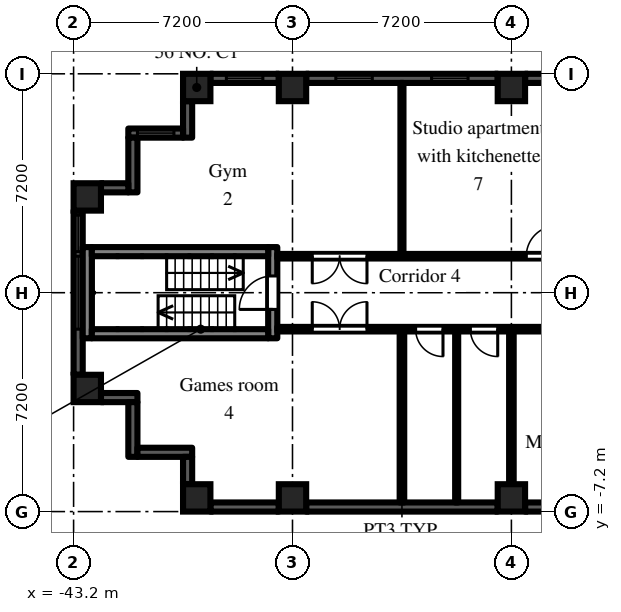
"""IFC4 building model, lengths in metres.
Left out: names, types, materials, properties, quantities, classifications, styles, units other than length and angle.
Written with IfcOpenShell. Run it as: python <this file> out.ifc"""

import sys

from ifc_helpers import new_model, si_unit, direction, frame, frame_2d, origin, origin_2d, place, context, subcontext, project, spatial, rectangle, extrude, element, fill, save


model = new_model("IFC4")
c1 = context("Model", 3, precision=1e-05, world=origin(), true_north=direction((0.0, 1.0)))
c2 = subcontext(c1, "Body", "Model", "MODEL_VIEW")
j1 = project(units=[si_unit("LENGTHUNIT", "METRE"), si_unit("PLANEANGLEUNIT", "RADIAN")], contexts=[c1])
p1 = place(None, origin())
s1 = spatial("IfcSite", under=j1, at=p1, CompositionType="ELEMENT")
p2 = place(p1, origin())
s2 = spatial("IfcBuilding", under=s1, at=p2, CompositionType="ELEMENT")
p3 = place(p2, frame((0.0, 0.0, 53.7)))
s3 = spatial("IfcBuildingStorey", under=s2, at=p3, CompositionType="ELEMENT", Elevation=53.7)
for number, where, z_axis, x_axis in (
    (1, (-42.75, -3.15, 0.0), (0.0, 0.0, 1.0), (1.0, 0.0, 0.0)),
    (2, (-42.75, 3.15, 0.0), (0.0, 0.0, 1.0), (1.0, 0.0, 0.0)),
    (3, (-39.15, -6.75, 0.0), (0.0, 0.0, 1.0), (1.0, 0.0, 0.0)),
    (4, (-39.15, 6.75, 0.0), (0.0, 0.0, 1.0), (1.0, 0.0, 0.0)),
    (5, (-36.0, -6.75, 0.0), (0.0, 0.0, 1.0), (1.0, 0.0, 0.0)),
    (6, (-36.0, 6.75, 0.0), (0.0, 0.0, 1.0), (1.0, 0.0, 0.0)),
    (7, (-28.8, -6.75, 0.0), (0.0, 0.0, 1.0), (1.0, 0.0, 0.0)),
    (8, (-28.8, 6.75, 0.0), (0.0, 0.0, 1.0), (1.0, 0.0, 0.0)),
):
    element("IfcColumn", number, at=place(p3, frame(where, z_axis=z_axis, x_axis=x_axis)), inside=s3, PredefinedType="COLUMN", context=c2, shape_type="SweptSolid", body=[
        extrude(rectangle(XDim=0.9, YDim=0.9, at=origin_2d()), origin(), (0.0, 0.0, 1.0), 3.0),
    ])
p4 = place(p3, frame((-25.2, 7.05, 0.0), z_axis=(0.0, 0.0, 1.0), x_axis=(-1.0, 0.0, 0.0)))
e9 = element("IfcWall", 9, at=p4, inside=s3, PredefinedType="SOLIDWALL", context=c2, shape_type="SweptSolid", body=[
    extrude(rectangle(XDim=3.15, YDim=0.3, at=frame_2d((1.575, 0.0))), origin(), (0.0, 0.0, 1.0), 2.1),
])
p5 = place(p4, frame((0.975, 0.0, 0.2)))
e10 = element("IfcOpeningElement", 10, at=p5, cuts=e9, PredefinedType="OPENING", context=c2, shape_type="SweptSolid", body=[
    extrude(rectangle(XDim=1.2, YDim=1.85, at=frame_2d((0.6, 0.925))), frame((0.0, 0.16, 0.0), z_axis=(0.0, -1.0, 0.0), x_axis=(1.0, 0.0, 0.0)), (0.0, 0.0, 1.0), 0.32),
])
p6 = place(p3, frame((-29.25, 7.05, 0.0), z_axis=(0.0, 0.0, 1.0), x_axis=(-1.0, 0.0, 0.0)))
e11 = element("IfcWall", 11, at=p6, inside=s3, PredefinedType="SOLIDWALL", context=c2, shape_type="SweptSolid", body=[
    extrude(rectangle(XDim=6.3, YDim=0.3, at=frame_2d((3.15, 0.0))), origin(), (0.0, 0.0, 1.0), 2.1),
])
p7 = place(p6, frame((0.975, 0.0, 0.2)))
e12 = element("IfcOpeningElement", 12, at=p7, cuts=e11, PredefinedType="OPENING", context=c2, shape_type="SweptSolid", body=[
    extrude(rectangle(XDim=1.2, YDim=1.85, at=frame_2d((0.6, 0.925))), frame((0.0, 0.16, 0.0), z_axis=(0.0, -1.0, 0.0), x_axis=(1.0, 0.0, 0.0)), (0.0, 0.0, 1.0), 0.32),
])
p8 = place(p6, frame((4.125, 0.0, 0.2)))
e13 = element("IfcOpeningElement", 13, at=p8, cuts=e11, PredefinedType="OPENING", context=c2, shape_type="SweptSolid", body=[
    extrude(rectangle(XDim=1.2, YDim=1.85, at=frame_2d((0.6, 0.925))), frame((0.0, 0.16, 0.0), z_axis=(0.0, -1.0, 0.0), x_axis=(1.0, 0.0, 0.0)), (0.0, 0.0, 1.0), 0.32),
])
p9 = place(p3, frame((-36.45, 7.05, 0.0), z_axis=(0.0, 0.0, 1.0), x_axis=(-1.0, 0.0, 0.0)))
e14 = element("IfcWall", 14, at=p9, inside=s3, PredefinedType="SOLIDWALL", context=c2, shape_type="SweptSolid", body=[
    extrude(rectangle(XDim=2.25, YDim=0.3, at=frame_2d((1.125, 0.0))), origin(), (0.0, 0.0, 1.0), 2.1),
])
p10 = place(p9, frame((0.525, 0.0, 0.2)))
e15 = element("IfcOpeningElement", 15, at=p10, cuts=e14, PredefinedType="OPENING", context=c2, shape_type="SweptSolid", body=[
    extrude(rectangle(XDim=1.2, YDim=1.85, at=frame_2d((0.6, 0.925))), frame((0.0, 0.16, 0.0), z_axis=(0.0, -1.0, 0.0), x_axis=(1.0, 0.0, 0.0)), (0.0, 0.0, 1.0), 0.32),
])
p11 = place(p3, frame((-39.45, 6.3, 0.0), z_axis=(0.0, 0.0, 1.0), x_axis=(0.0, -1.0, 0.0)))
e16 = element("IfcWall", 16, at=p11, inside=s3, PredefinedType="SOLIDWALL", context=c2, shape_type="SweptSolid", body=[
    extrude(rectangle(XDim=1.2, YDim=0.3, at=frame_2d((0.6, 0.0))), origin(), (0.0, 0.0, 1.0), 2.575),
])
p12 = place(p3, frame((-39.6, 5.25, 0.0), z_axis=(0.0, 0.0, 1.0), x_axis=(-1.0, 0.0, 0.0)))
e17 = element("IfcWall", 17, at=p12, inside=s3, PredefinedType="SOLIDWALL", context=c2, shape_type="SweptSolid", body=[
    extrude(rectangle(XDim=1.8, YDim=0.3, at=frame_2d((0.9, 0.0))), origin(), (0.0, 0.0, 1.0), 2.575),
])
p13 = place(p12, frame((0.3, 0.0, 0.2)))
e18 = element("IfcOpeningElement", 18, at=p13, cuts=e17, PredefinedType="OPENING", context=c2, shape_type="SweptSolid", body=[
    extrude(rectangle(XDim=1.2, YDim=1.85, at=frame_2d((0.6, 0.925))), frame((0.0, 0.16, 0.0), z_axis=(0.0, -1.0, 0.0), x_axis=(1.0, 0.0, 0.0)), (0.0, 0.0, 1.0), 0.32),
])
p14 = place(p3, frame((-41.25, 5.1, 0.0), z_axis=(0.0, 0.0, 1.0), x_axis=(0.0, -1.0, 0.0)))
e19 = element("IfcWall", 19, at=p14, inside=s3, PredefinedType="SOLIDWALL", context=c2, shape_type="SweptSolid", body=[
    extrude(rectangle(XDim=1.8, YDim=0.3, at=frame_2d((0.9, 0.0))), origin(), (0.0, 0.0, 1.0), 2.575),
])
p15 = place(p3, frame((-41.4, 3.45, 0.0), z_axis=(0.0, 0.0, 1.0), x_axis=(-1.0, 0.0, 0.0)))
e20 = element("IfcWall", 20, at=p15, inside=s3, PredefinedType="SOLIDWALL", context=c2, shape_type="SweptSolid", body=[
    extrude(rectangle(XDim=0.9, YDim=0.3, at=frame_2d((0.45, 0.0))), origin(), (0.0, 0.0, 1.0), 2.575),
])
p16 = place(p3, frame((-43.05, 2.7, 0.0), z_axis=(0.0, 0.0, 1.0), x_axis=(0.0, -1.0, 0.0)))
e21 = element("IfcWall", 21, at=p16, inside=s3, PredefinedType="SOLIDWALL", context=c2, shape_type="SweptSolid", body=[
    extrude(rectangle(XDim=5.4, YDim=0.3, at=frame_2d((2.7, 0.0))), origin(), (0.0, 0.0, 1.0), 2.1),
])
p17 = place(p16, frame((1.5, 0.0, 0.2)))
e22 = element("IfcOpeningElement", 22, at=p17, cuts=e21, PredefinedType="OPENING", context=c2, shape_type="SweptSolid", body=[
    extrude(rectangle(XDim=2.4, YDim=1.85, at=frame_2d((1.2, 0.925))), frame((0.0, 0.16, 0.0), z_axis=(0.0, -1.0, 0.0), x_axis=(1.0, 0.0, 0.0)), (0.0, 0.0, 1.0), 0.32),
])
p18 = place(p16, frame((0.15, 0.0, 0.2)))
e23 = element("IfcOpeningElement", 23, at=p18, cuts=e21, PredefinedType="OPENING", context=c2, shape_type="SweptSolid", body=[
    extrude(rectangle(XDim=1.2, YDim=1.85, at=frame_2d((0.6, 0.925))), frame((0.0, 0.16, 0.0), z_axis=(0.0, -1.0, 0.0), x_axis=(1.0, 0.0, 0.0)), (0.0, 0.0, 1.0), 0.32),
])
p19 = place(p3, frame((-42.3, -3.45, 0.0), z_axis=(0.0, 0.0, 1.0), x_axis=(1.0, 0.0, 0.0)))
e24 = element("IfcWall", 24, at=p19, inside=s3, PredefinedType="SOLIDWALL", context=c2, shape_type="SweptSolid", body=[
    extrude(rectangle(XDim=1.2, YDim=0.3, at=frame_2d((0.6, 0.0))), origin(), (0.0, 0.0, 1.0), 2.575),
])
p20 = place(p3, frame((-41.25, -3.6, 0.0), z_axis=(0.0, 0.0, 1.0), x_axis=(0.0, -1.0, 0.0)))
e25 = element("IfcWall", 25, at=p20, inside=s3, PredefinedType="SOLIDWALL", context=c2, shape_type="SweptSolid", body=[
    extrude(rectangle(XDim=1.8, YDim=0.3, at=frame_2d((0.9, 0.0))), origin(), (0.0, 0.0, 1.0), 2.575),
])
p21 = place(p3, frame((-41.1, -5.25, 0.0), z_axis=(0.0, 0.0, 1.0), x_axis=(1.0, 0.0, 0.0)))
e26 = element("IfcWall", 26, at=p21, inside=s3, PredefinedType="SOLIDWALL", context=c2, shape_type="SweptSolid", body=[
    extrude(rectangle(XDim=1.8, YDim=0.3, at=frame_2d((0.9, 0.0))), origin(), (0.0, 0.0, 1.0), 2.575),
])
p22 = place(p3, frame((-39.45, -5.4, 0.0), z_axis=(0.0, 0.0, 1.0), x_axis=(0.0, -1.0, 0.0)))
e27 = element("IfcWall", 27, at=p22, inside=s3, PredefinedType="SOLIDWALL", context=c2, shape_type="SweptSolid", body=[
    extrude(rectangle(XDim=0.9, YDim=0.3, at=frame_2d((0.45, 0.0))), origin(), (0.0, 0.0, 1.0), 2.575),
])
p23 = place(p3, frame((-38.7, -7.05, 0.0), z_axis=(0.0, 0.0, 1.0), x_axis=(1.0, 0.0, 0.0)))
e28 = element("IfcWall", 28, at=p23, inside=s3, PredefinedType="SOLIDWALL", context=c2, shape_type="SweptSolid", body=[
    extrude(rectangle(XDim=2.25, YDim=0.3, at=frame_2d((1.125, 0.0))), origin(), (0.0, 0.0, 1.0), 2.1),
])
p24 = place(p3, frame((-35.55, -7.05, 0.0), z_axis=(0.0, 0.0, 1.0), x_axis=(1.0, 0.0, 0.0)))
e29 = element("IfcWall", 29, at=p24, inside=s3, PredefinedType="SOLIDWALL", context=c2, shape_type="SweptSolid", body=[
    extrude(rectangle(XDim=6.3, YDim=0.3, at=frame_2d((3.15, 0.0))), origin(), (0.0, 0.0, 1.0), 2.1),
])
p25 = place(p3, frame((-28.35, -7.05, 0.0), z_axis=(0.0, 0.0, 1.0), x_axis=(1.0, 0.0, 0.0)))
e30 = element("IfcWall", 30, at=p25, inside=s3, PredefinedType="SOLIDWALL", context=c2, shape_type="SweptSolid", body=[
    extrude(rectangle(XDim=3.15, YDim=0.3, at=frame_2d((1.575, 0.0))), origin(), (0.0, 0.0, 1.0), 2.1),
])
p26 = place(p3, frame((-36.65, -1.5, 0.0), z_axis=(0.0, 0.0, 1.0), x_axis=(0.0, 1.0, 0.0)))
e31 = element("IfcWall", 31, at=p26, inside=s3, PredefinedType="SHEAR", context=c2, shape_type="SweptSolid", body=[
    extrude(rectangle(XDim=3.0, YDim=0.3, at=frame_2d((1.5, 0.0))), origin(), (0.0, 0.0, 1.0), 2.575),
])
p27 = place(p26, frame((0.95, 0.0, 0.0)))
e32 = element("IfcOpeningElement", 32, at=p27, cuts=e31, PredefinedType="OPENING", context=c2, shape_type="SweptSolid", body=[
    extrude(rectangle(XDim=1.1, YDim=2.1, at=frame_2d((0.55, 1.05))), frame((0.0, 0.16, 0.0), z_axis=(0.0, -1.0, 0.0), x_axis=(1.0, 0.0, 0.0)), (0.0, 0.0, 1.0), 0.32),
])
p28 = place(p3, frame((-42.75, -1.5, 0.0), z_axis=(0.0, 0.0, 1.0), x_axis=(0.0, 1.0, 0.0)))
e33 = element("IfcWall", 33, at=p28, inside=s3, PredefinedType="SHEAR", context=c2, shape_type="SweptSolid", body=[
    extrude(rectangle(XDim=3.0, YDim=0.3, at=frame_2d((1.5, 0.0))), origin(), (0.0, 0.0, 1.0), 2.575),
])
for number, where, z_axis, x_axis in (
    (34, (-36.8, -1.35, 0.0), (0.0, 0.0, 1.0), (-1.0, 0.0, 0.0)),
    (35, (-36.8, 1.35, 0.0), (0.0, 0.0, 1.0), (-1.0, 0.0, 0.0)),
):
    element("IfcWall", number, at=place(p3, frame(where, z_axis=z_axis, x_axis=x_axis)), inside=s3, PredefinedType="SHEAR", context=c2, shape_type="SweptSolid", body=[
        extrude(rectangle(XDim=5.8, YDim=0.3, at=frame_2d((2.9, 0.0))), origin(), (0.0, 0.0, 1.0), 2.575),
    ])
p29 = place(p3, frame((-36.5, -1.2, 0.0), z_axis=(0.0, 0.0, 1.0), x_axis=(1.0, 0.0, 0.0)))
e36 = element("IfcWall", 36, at=p29, inside=s3, PredefinedType="PARTITIONING", context=c2, shape_type="SweptSolid", body=[
    extrude(rectangle(XDim=14.9, YDim=0.15, at=frame_2d((7.45, 0.0))), origin(), (0.0, 0.0, 1.0), 2.575),
])
p30 = place(p29, frame((10.4, 0.0, 0.0)))
e37 = element("IfcOpeningElement", 37, at=p30, cuts=e36, PredefinedType="OPENING", context=c2, shape_type="SweptSolid", body=[
    extrude(rectangle(XDim=1.8, YDim=2.1, at=frame_2d((0.9, 1.05))), frame((0.0, 0.085, 0.0), z_axis=(0.0, -1.0, 0.0), x_axis=(1.0, 0.0, 0.0)), (0.0, 0.0, 1.0), 0.17),
])
p31 = place(p29, frame((6.35, 0.0, 0.0)))
e38 = element("IfcOpeningElement", 38, at=p31, cuts=e36, PredefinedType="OPENING", context=c2, shape_type="SweptSolid", body=[
    extrude(rectangle(XDim=0.9, YDim=2.1, at=frame_2d((0.45, 1.05))), frame((0.0, 0.085, 0.0), z_axis=(0.0, -1.0, 0.0), x_axis=(1.0, 0.0, 0.0)), (0.0, 0.0, 1.0), 0.17),
])
p32 = place(p29, frame((4.55, 0.0, 0.0)))
e39 = element("IfcOpeningElement", 39, at=p32, cuts=e36, PredefinedType="OPENING", context=c2, shape_type="SweptSolid", body=[
    extrude(rectangle(XDim=0.9, YDim=2.1, at=frame_2d((0.45, 1.05))), frame((0.0, 0.085, 0.0), z_axis=(0.0, -1.0, 0.0), x_axis=(1.0, 0.0, 0.0)), (0.0, 0.0, 1.0), 0.17),
])
p33 = place(p29, frame((1.15, 0.0, 0.0)))
e40 = element("IfcOpeningElement", 40, at=p33, cuts=e36, PredefinedType="OPENING", context=c2, shape_type="SweptSolid", body=[
    extrude(rectangle(XDim=1.8, YDim=2.1, at=frame_2d((0.9, 1.05))), frame((0.0, 0.085, 0.0), z_axis=(0.0, -1.0, 0.0), x_axis=(1.0, 0.0, 0.0)), (0.0, 0.0, 1.0), 0.17),
])
p34 = place(p3, frame((-36.5, 1.2, 0.0), z_axis=(0.0, 0.0, 1.0), x_axis=(1.0, 0.0, 0.0)))
e41 = element("IfcWall", 41, at=p34, inside=s3, PredefinedType="PARTITIONING", context=c2, shape_type="SweptSolid", body=[
    extrude(rectangle(XDim=14.9, YDim=0.15, at=frame_2d((7.45, 0.0))), origin(), (0.0, 0.0, 1.0), 2.575),
])
p35 = place(p34, frame((13.7, 0.0, 0.0)))
e42 = element("IfcOpeningElement", 42, at=p35, cuts=e41, PredefinedType="OPENING", context=c2, shape_type="SweptSolid", body=[
    extrude(rectangle(XDim=1.0, YDim=2.1, at=frame_2d((0.5, 1.05))), frame((0.0, 0.085, 0.0), z_axis=(0.0, -1.0, 0.0), x_axis=(1.0, 0.0, 0.0)), (0.0, 0.0, 1.0), 0.17),
])
p36 = place(p34, frame((8.19, 0.0, 0.0)))
e43 = element("IfcOpeningElement", 43, at=p36, cuts=e41, PredefinedType="OPENING", context=c2, shape_type="SweptSolid", body=[
    extrude(rectangle(XDim=1.0, YDim=2.1, at=frame_2d((0.5, 1.05))), frame((0.0, 0.085, 0.0), z_axis=(0.0, -1.0, 0.0), x_axis=(1.0, 0.0, 0.0)), (0.0, 0.0, 1.0), 0.17),
])
p37 = place(p34, frame((1.15, 0.0, 0.0)))
e44 = element("IfcOpeningElement", 44, at=p37, cuts=e41, PredefinedType="OPENING", context=c2, shape_type="SweptSolid", body=[
    extrude(rectangle(XDim=1.8, YDim=2.1, at=frame_2d((0.9, 1.05))), frame((0.0, 0.085, 0.0), z_axis=(0.0, -1.0, 0.0), x_axis=(1.0, 0.0, 0.0)), (0.0, 0.0, 1.0), 0.17),
])
p38 = place(p3, frame((-32.4, -6.9, 0.0), z_axis=(0.0, 0.0, 1.0), x_axis=(0.0, 1.0, 0.0)))
e45 = element("IfcWall", 45, at=p38, inside=s3, PredefinedType="PARTITIONING", context=c2, shape_type="SweptSolid", body=[
    extrude(rectangle(XDim=5.625, YDim=0.15, at=frame_2d((2.812, 0.0))), origin(), (0.0, 0.0, 1.0), 2.575),
])
for number, where, z_axis, x_axis in (
    (46, (-32.4, 1.275, 0.0), (0.0, 0.0, 1.0), (0.0, 1.0, 0.0)),
    (47, (-30.6, -6.9, 0.0), (0.0, 0.0, 1.0), (0.0, 1.0, 0.0)),
):
    element("IfcWall", number, at=place(p3, frame(where, z_axis=z_axis, x_axis=x_axis)), inside=s3, PredefinedType="PARTITIONING", context=c2, shape_type="SweptSolid", body=[
        extrude(rectangle(XDim=5.625, YDim=0.1, at=frame_2d((2.812, 0.0))), origin(), (0.0, 0.0, 1.0), 2.575),
    ])
p39 = place(p3, frame((-28.8, -6.9, 0.0), z_axis=(0.0, 0.0, 1.0), x_axis=(0.0, 1.0, 0.0)))
e48 = element("IfcWall", 48, at=p39, inside=s3, PredefinedType="PARTITIONING", context=c2, shape_type="SweptSolid", body=[
    extrude(rectangle(XDim=5.625, YDim=0.15, at=frame_2d((2.812, 0.0))), origin(), (0.0, 0.0, 1.0), 2.575),
])
p40 = place(p7, origin())
e49 = element("IfcWindow", 49, at=p40, inside=s3, PartitioningType="SINGLE_PANEL", PredefinedType="WINDOW", context=c2, shape_type="SweptSolid", body=[
    extrude(rectangle(XDim=1.2, YDim=1.85, at=frame_2d((0.6, 0.925))), frame((0.0, 0.03, 0.0), z_axis=(0.0, -1.0, 0.0), x_axis=(1.0, 0.0, 0.0)), (0.0, 0.0, 1.0), 0.06),
])
fill(e12, e49)
p41 = place(p8, origin())
e50 = element("IfcWindow", 50, at=p41, inside=s3, PartitioningType="SINGLE_PANEL", PredefinedType="WINDOW", context=c2, shape_type="SweptSolid", body=[
    extrude(rectangle(XDim=1.2, YDim=1.85, at=frame_2d((0.6, 0.925))), frame((0.0, 0.03, 0.0), z_axis=(0.0, -1.0, 0.0), x_axis=(1.0, 0.0, 0.0)), (0.0, 0.0, 1.0), 0.06),
])
fill(e13, e50)
p42 = place(p10, origin())
e51 = element("IfcWindow", 51, at=p42, inside=s3, PartitioningType="SINGLE_PANEL", PredefinedType="WINDOW", context=c2, shape_type="SweptSolid", body=[
    extrude(rectangle(XDim=1.2, YDim=1.85, at=frame_2d((0.6, 0.925))), frame((0.0, 0.03, 0.0), z_axis=(0.0, -1.0, 0.0), x_axis=(1.0, 0.0, 0.0)), (0.0, 0.0, 1.0), 0.06),
])
fill(e15, e51)
p43 = place(p13, origin())
e52 = element("IfcWindow", 52, at=p43, inside=s3, PartitioningType="SINGLE_PANEL", PredefinedType="WINDOW", context=c2, shape_type="SweptSolid", body=[
    extrude(rectangle(XDim=1.2, YDim=1.85, at=frame_2d((0.6, 0.925))), frame((0.0, 0.03, 0.0), z_axis=(0.0, -1.0, 0.0), x_axis=(1.0, 0.0, 0.0)), (0.0, 0.0, 1.0), 0.06),
])
fill(e18, e52)
p44 = place(p17, origin())
e53 = element("IfcWindow", 53, at=p44, inside=s3, PartitioningType="SINGLE_PANEL", PredefinedType="WINDOW", context=c2, shape_type="SweptSolid", body=[
    extrude(rectangle(XDim=2.4, YDim=1.85, at=frame_2d((1.2, 0.925))), frame((0.0, 0.03, 0.0), z_axis=(0.0, -1.0, 0.0), x_axis=(1.0, 0.0, 0.0)), (0.0, 0.0, 1.0), 0.06),
])
fill(e22, e53)
p45 = place(p18, origin())
e54 = element("IfcWindow", 54, at=p45, inside=s3, PartitioningType="SINGLE_PANEL", PredefinedType="WINDOW", context=c2, shape_type="SweptSolid", body=[
    extrude(rectangle(XDim=1.2, YDim=1.85, at=frame_2d((0.6, 0.925))), frame((0.0, 0.03, 0.0), z_axis=(0.0, -1.0, 0.0), x_axis=(1.0, 0.0, 0.0)), (0.0, 0.0, 1.0), 0.06),
])
fill(e23, e54)
p46 = place(p27, origin())
e55 = element("IfcDoor", 55, at=p46, inside=s3, OperationType="SINGLE_SWING_LEFT", PredefinedType="DOOR", context=c2, shape_type="SweptSolid", body=[
    extrude(rectangle(XDim=1.1, YDim=2.1, at=frame_2d((0.55, 1.05))), frame((0.0, 0.025, 0.0), z_axis=(0.0, -1.0, 0.0), x_axis=(1.0, 0.0, 0.0)), (0.0, 0.0, 1.0), 0.05),
])
fill(e32, e55)
p47 = place(p31, frame((0.9, 0.0, 0.0), z_axis=(0.0, 0.0, 1.0), x_axis=(-1.0, 0.0, 0.0)))
e56 = element("IfcDoor", 56, at=p47, inside=s3, OperationType="SINGLE_SWING_LEFT", PredefinedType="DOOR", context=c2, shape_type="SweptSolid", body=[
    extrude(rectangle(XDim=0.9, YDim=2.1, at=frame_2d((0.45, 1.05))), frame((0.0, 0.025, 0.0), z_axis=(0.0, -1.0, 0.0), x_axis=(1.0, 0.0, 0.0)), (0.0, 0.0, 1.0), 0.05),
])
fill(e38, e56)
p48 = place(p32, frame((0.9, 0.0, 0.0), z_axis=(0.0, 0.0, 1.0), x_axis=(-1.0, 0.0, 0.0)))
e57 = element("IfcDoor", 57, at=p48, inside=s3, OperationType="SINGLE_SWING_LEFT", PredefinedType="DOOR", context=c2, shape_type="SweptSolid", body=[
    extrude(rectangle(XDim=0.9, YDim=2.1, at=frame_2d((0.45, 1.05))), frame((0.0, 0.025, 0.0), z_axis=(0.0, -1.0, 0.0), x_axis=(1.0, 0.0, 0.0)), (0.0, 0.0, 1.0), 0.05),
])
fill(e39, e57)
p49 = place(p33, origin())
e58 = element("IfcDoor", 58, at=p49, inside=s3, OperationType="DOUBLE_DOOR_DOUBLE_SWING", PredefinedType="DOOR", context=c2, shape_type="SweptSolid", body=[
    extrude(rectangle(XDim=1.8, YDim=2.1, at=frame_2d((0.9, 1.05))), frame((0.0, 0.025, 0.0), z_axis=(0.0, -1.0, 0.0), x_axis=(1.0, 0.0, 0.0)), (0.0, 0.0, 1.0), 0.05),
])
fill(e40, e58)
p50 = place(p36, origin())
e59 = element("IfcDoor", 59, at=p50, inside=s3, OperationType="SINGLE_SWING_RIGHT", PredefinedType="DOOR", context=c2, shape_type="SweptSolid", body=[
    extrude(rectangle(XDim=1.0, YDim=2.1, at=frame_2d((0.5, 1.05))), frame((0.0, 0.025, 0.0), z_axis=(0.0, -1.0, 0.0), x_axis=(1.0, 0.0, 0.0)), (0.0, 0.0, 1.0), 0.05),
])
fill(e43, e59)
p51 = place(p37, frame((1.8, 0.0, 0.0), z_axis=(0.0, 0.0, 1.0), x_axis=(-1.0, 0.0, 0.0)))
e60 = element("IfcDoor", 60, at=p51, inside=s3, OperationType="DOUBLE_DOOR_DOUBLE_SWING", PredefinedType="DOOR", context=c2, shape_type="SweptSolid", body=[
    extrude(rectangle(XDim=1.8, YDim=2.1, at=frame_2d((0.9, 1.05))), frame((0.0, 0.025, 0.0), z_axis=(0.0, -1.0, 0.0), x_axis=(1.0, 0.0, 0.0)), (0.0, 0.0, 1.0), 0.05),
])
fill(e44, e60)
save(model, sys.argv[1])
